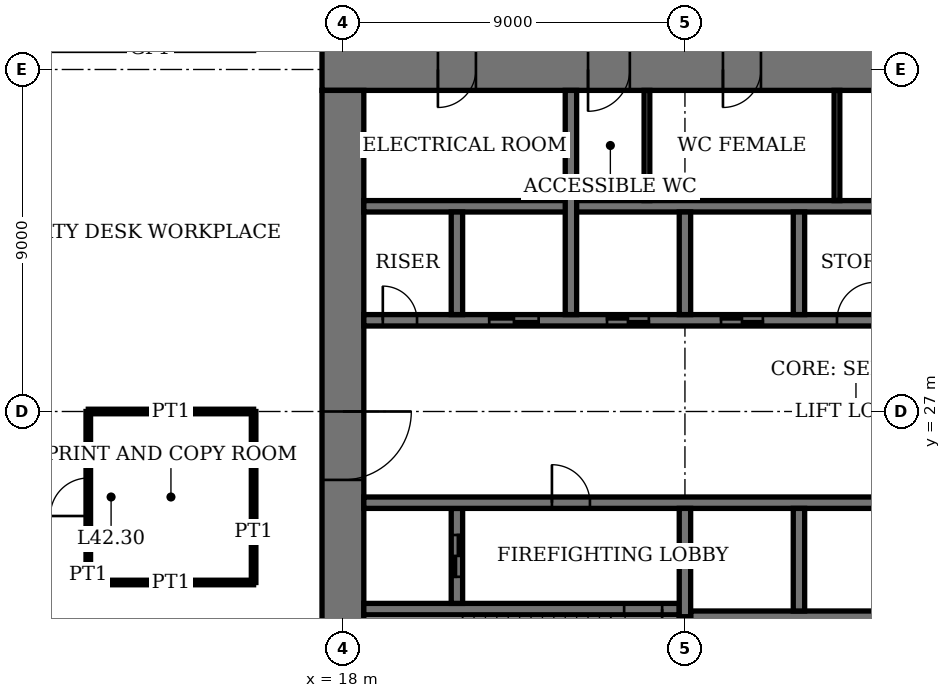
"""IFC4 building model, lengths in metres.
Left out: names, types, materials, properties, quantities, classifications, styles, units other than length and angle.
Written with IfcOpenShell. Run it as: python <this file> out.ifc"""

import sys

from ifc_helpers import new_model, si_unit, direction, frame, frame_2d, origin, place, context, subcontext, project, spatial, rectangle, extrude, element, fill, save


model = new_model("IFC4")
c1 = context("Model", 3, precision=1e-05, world=origin(), true_north=direction((0.0, 1.0)))
c2 = subcontext(c1, "Body", "Model", "MODEL_VIEW")
j1 = project(units=[si_unit("LENGTHUNIT", "METRE"), si_unit("PLANEANGLEUNIT", "RADIAN")], contexts=[c1])
p1 = place(None, origin())
s1 = spatial("IfcSite", under=j1, at=p1, CompositionType="ELEMENT")
p2 = place(p1, origin())
s2 = spatial("IfcBuilding", under=s1, at=p2, CompositionType="ELEMENT")
p3 = place(p2, frame((0.0, 0.0, 174.2)))
s3 = spatial("IfcBuildingStorey", under=s2, at=p3, CompositionType="ELEMENT", Elevation=174.2)
p4 = place(p3, frame((45.55, 36.0, 0.0), z_axis=(0.0, 0.0, 1.0), x_axis=(-1.0, 0.0, 0.0)))
e1 = element("IfcWall", 1, at=p4, inside=s3, PredefinedType="SHEAR", context=c2, shape_type="SweptSolid", body=[
    extrude(rectangle(XDim=28.1, YDim=1.1, at=frame_2d((14.05, 0.0))), origin(), (0.0, 0.0, 1.0), 4.0),
])
p5 = place(p4, frame((11.55, 0.0, 0.0)))
e2 = element("IfcOpeningElement", 2, at=p5, cuts=e1, PredefinedType="OPENING", context=c2, shape_type="SweptSolid", body=[
    extrude(rectangle(XDim=1.0, YDim=2.4, at=frame_2d((0.5, 1.2))), frame((0.0, 0.56, 0.0), z_axis=(0.0, -1.0, 0.0), x_axis=(1.0, 0.0, 0.0)), (0.0, 0.0, 1.0), 1.12),
])
p6 = place(p4, frame((16.55, 0.0, 0.0)))
e3 = element("IfcOpeningElement", 3, at=p6, cuts=e1, PredefinedType="OPENING", context=c2, shape_type="SweptSolid", body=[
    extrude(rectangle(XDim=1.0, YDim=2.4, at=frame_2d((0.5, 1.2))), frame((0.0, 0.56, 0.0), z_axis=(0.0, -1.0, 0.0), x_axis=(1.0, 0.0, 0.0)), (0.0, 0.0, 1.0), 1.12),
])
p7 = place(p4, frame((20.0, 0.0, 0.0)))
e4 = element("IfcOpeningElement", 4, at=p7, cuts=e1, PredefinedType="OPENING", context=c2, shape_type="SweptSolid", body=[
    extrude(rectangle(XDim=1.1, YDim=2.4, at=frame_2d((0.55, 1.2))), frame((0.0, 0.56, 0.0), z_axis=(0.0, -1.0, 0.0), x_axis=(1.0, 0.0, 0.0)), (0.0, 0.0, 1.0), 1.12),
])
p8 = place(p4, frame((24.05, 0.0, 0.0)))
e5 = element("IfcOpeningElement", 5, at=p8, cuts=e1, PredefinedType="OPENING", context=c2, shape_type="SweptSolid", body=[
    extrude(rectangle(XDim=1.0, YDim=2.4, at=frame_2d((0.5, 1.2))), frame((0.0, 0.56, 0.0), z_axis=(0.0, -1.0, 0.0), x_axis=(1.0, 0.0, 0.0)), (0.0, 0.0, 1.0), 1.12),
])
p9 = place(p3, frame((18.0, 35.45, 0.0), z_axis=(0.0, 0.0, 1.0), x_axis=(0.0, -1.0, 0.0)))
e6 = element("IfcWall", 6, at=p9, inside=s3, PredefinedType="SHEAR", context=c2, shape_type="SweptSolid", body=[
    extrude(rectangle(XDim=16.9, YDim=1.1, at=frame_2d((8.45, 0.0))), origin(), (0.0, 0.0, 1.0), 4.0),
])
p10 = place(p9, frame((8.45, 0.0, 0.0)))
e7 = element("IfcOpeningElement", 7, at=p10, cuts=e6, PredefinedType="OPENING", context=c2, shape_type="SweptSolid", body=[
    extrude(rectangle(XDim=1.8, YDim=2.4, at=frame_2d((0.9, 1.2))), frame((0.0, 0.56, 0.0), z_axis=(0.0, -1.0, 0.0), x_axis=(1.0, 0.0, 0.0)), (0.0, 0.0, 1.0), 1.12),
])
p11 = place(p3, frame((18.55, 21.8, 0.0), z_axis=(0.0, 0.0, 1.0), x_axis=(1.0, 0.0, 0.0)))
e8 = element("IfcWall", 8, at=p11, inside=s3, PredefinedType="SHEAR", context=c2, shape_type="SweptSolid", body=[
    extrude(rectangle(XDim=8.3, YDim=0.3, at=frame_2d((4.15, 0.0))), origin(), (0.0, 0.0, 1.0), 4.0),
])
p12 = place(p11, frame((6.85, 0.0, 0.0)))
e9 = element("IfcOpeningElement", 9, at=p12, cuts=e8, PredefinedType="OPENING", context=c2, shape_type="SweptSolid", body=[
    extrude(rectangle(XDim=1.0, YDim=2.4, at=frame_2d((0.5, 1.2))), frame((0.0, 0.16, 0.0), z_axis=(0.0, -1.0, 0.0), x_axis=(1.0, 0.0, 0.0)), (0.0, 0.0, 1.0), 0.32),
])
p13 = place(p3, frame((27.0, 18.55, 0.0), z_axis=(0.0, 0.0, 1.0), x_axis=(0.0, 1.0, 0.0)))
e10 = element("IfcWall", 10, at=p13, inside=s3, PredefinedType="SHEAR", context=c2, shape_type="SweptSolid", body=[
    extrude(rectangle(XDim=3.05, YDim=0.3, at=frame_2d((1.525, 0.0))), origin(), (0.0, 0.0, 1.0), 4.0),
])
p14 = place(p3, frame((21.0, 21.95, 0.0), z_axis=(0.0, 0.0, 1.0), x_axis=(0.0, 1.0, 0.0)))
e11 = element("IfcWall", 11, at=p14, inside=s3, PredefinedType="SHEAR", context=c2, shape_type="SweptSolid", body=[
    extrude(rectangle(XDim=2.5, YDim=0.3, at=frame_2d((1.25, 0.0))), origin(), (0.0, 0.0, 1.0), 4.0),
])
p15 = place(p14, frame((0.7, 0.0, 0.0)))
e12 = element("IfcOpeningElement", 12, at=p15, cuts=e11, PredefinedType="OPENING", context=c2, shape_type="SweptSolid", body=[
    extrude(rectangle(XDim=1.1, YDim=2.4, at=frame_2d((0.55, 1.2))), frame((0.0, 0.16, 0.0), z_axis=(0.0, -1.0, 0.0), x_axis=(1.0, 0.0, 0.0)), (0.0, 0.0, 1.0), 0.32),
])
p16 = place(p3, frame((18.55, 24.6, 0.0), z_axis=(0.0, 0.0, 1.0), x_axis=(1.0, 0.0, 0.0)))
e13 = element("IfcWall", 13, at=p16, inside=s3, PredefinedType="SHEAR", context=c2, shape_type="SweptSolid", body=[
    extrude(rectangle(XDim=25.9, YDim=0.3, at=frame_2d((12.95, 0.0))), origin(), (0.0, 0.0, 1.0), 4.0),
])
p17 = place(p16, frame((4.95, 0.0, 0.0)))
e14 = element("IfcOpeningElement", 14, at=p17, cuts=e13, PredefinedType="OPENING", context=c2, shape_type="SweptSolid", body=[
    extrude(rectangle(XDim=1.0, YDim=2.4, at=frame_2d((0.5, 1.2))), frame((0.0, 0.16, 0.0), z_axis=(0.0, -1.0, 0.0), x_axis=(1.0, 0.0, 0.0)), (0.0, 0.0, 1.0), 0.32),
])
p18 = place(p16, frame((24.5, 0.0, 0.0)))
e15 = element("IfcOpeningElement", 15, at=p18, cuts=e13, PredefinedType="OPENING", context=c2, shape_type="SweptSolid", body=[
    extrude(rectangle(XDim=0.9, YDim=2.1, at=frame_2d((0.45, 1.05))), frame((0.0, 0.16, 0.0), z_axis=(0.0, -1.0, 0.0), x_axis=(1.0, 0.0, 0.0)), (0.0, 0.0, 1.0), 0.32),
])
p19 = place(p16, frame((21.3, 0.0, 0.0)))
e16 = element("IfcOpeningElement", 16, at=p19, cuts=e13, PredefinedType="OPENING", context=c2, shape_type="SweptSolid", body=[
    extrude(rectangle(XDim=1.3, YDim=2.4, at=frame_2d((0.65, 1.2))), frame((0.0, 0.16, 0.0), z_axis=(0.0, -1.0, 0.0), x_axis=(1.0, 0.0, 0.0)), (0.0, 0.0, 1.0), 0.32),
])
p20 = place(p3, frame((18.55, 29.4, 0.0), z_axis=(0.0, 0.0, 1.0), x_axis=(1.0, 0.0, 0.0)))
e17 = element("IfcWall", 17, at=p20, inside=s3, PredefinedType="SHEAR", context=c2, shape_type="SweptSolid", body=[
    extrude(rectangle(XDim=25.9, YDim=0.3, at=frame_2d((12.95, 0.0))), origin(), (0.0, 0.0, 1.0), 4.0),
])
p21 = place(p20, frame((19.95, 0.0, 0.0)))
e18 = element("IfcOpeningElement", 18, at=p21, cuts=e17, PredefinedType="OPENING", context=c2, shape_type="SweptSolid", body=[
    extrude(rectangle(XDim=1.0, YDim=2.4, at=frame_2d((0.5, 1.2))), frame((0.0, 0.16, 0.0), z_axis=(0.0, -1.0, 0.0), x_axis=(1.0, 0.0, 0.0)), (0.0, 0.0, 1.0), 0.32),
])
p22 = place(p20, frame((0.5, 0.0, 0.0)))
e19 = element("IfcOpeningElement", 19, at=p22, cuts=e17, PredefinedType="OPENING", context=c2, shape_type="SweptSolid", body=[
    extrude(rectangle(XDim=0.9, YDim=2.1, at=frame_2d((0.45, 1.05))), frame((0.0, 0.16, 0.0), z_axis=(0.0, -1.0, 0.0), x_axis=(1.0, 0.0, 0.0)), (0.0, 0.0, 1.0), 0.32),
])
p23 = place(p20, frame((15.45, 0.0, 0.0)))
e20 = element("IfcOpeningElement", 20, at=p23, cuts=e17, PredefinedType="OPENING", context=c2, shape_type="SweptSolid", body=[
    extrude(rectangle(XDim=1.0, YDim=2.4, at=frame_2d((0.5, 1.2))), frame((0.0, 0.16, 0.0), z_axis=(0.0, -1.0, 0.0), x_axis=(1.0, 0.0, 0.0)), (0.0, 0.0, 1.0), 0.32),
])
p24 = place(p20, frame((12.45, 0.0, 0.0)))
e21 = element("IfcOpeningElement", 21, at=p24, cuts=e17, PredefinedType="OPENING", context=c2, shape_type="SweptSolid", body=[
    extrude(rectangle(XDim=1.0, YDim=2.4, at=frame_2d((0.5, 1.2))), frame((0.0, 0.16, 0.0), z_axis=(0.0, -1.0, 0.0), x_axis=(1.0, 0.0, 0.0)), (0.0, 0.0, 1.0), 0.32),
])
p25 = place(p20, frame((9.4, 0.0, 0.0)))
e22 = element("IfcOpeningElement", 22, at=p25, cuts=e17, PredefinedType="OPENING", context=c2, shape_type="SweptSolid", body=[
    extrude(rectangle(XDim=1.1, YDim=2.4, at=frame_2d((0.55, 1.2))), frame((0.0, 0.16, 0.0), z_axis=(0.0, -1.0, 0.0), x_axis=(1.0, 0.0, 0.0)), (0.0, 0.0, 1.0), 0.32),
])
p26 = place(p20, frame((6.4, 0.0, 0.0)))
e23 = element("IfcOpeningElement", 23, at=p26, cuts=e17, PredefinedType="OPENING", context=c2, shape_type="SweptSolid", body=[
    extrude(rectangle(XDim=1.1, YDim=2.4, at=frame_2d((0.55, 1.2))), frame((0.0, 0.16, 0.0), z_axis=(0.0, -1.0, 0.0), x_axis=(1.0, 0.0, 0.0)), (0.0, 0.0, 1.0), 0.32),
])
p27 = place(p20, frame((3.3, 0.0, 0.0)))
e24 = element("IfcOpeningElement", 24, at=p27, cuts=e17, PredefinedType="OPENING", context=c2, shape_type="SweptSolid", body=[
    extrude(rectangle(XDim=1.3, YDim=2.4, at=frame_2d((0.65, 1.2))), frame((0.0, 0.16, 0.0), z_axis=(0.0, -1.0, 0.0), x_axis=(1.0, 0.0, 0.0)), (0.0, 0.0, 1.0), 0.32),
])
for number, where, z_axis, x_axis in (
    (25, (27.15, 21.6, 0.0), (0.0, 0.0, 1.0), (1.0, 0.0, 0.0)),
    (26, (18.55, 32.4, 0.0), (0.0, 0.0, 1.0), (1.0, 0.0, 0.0)),
):
    element("IfcWall", number, at=place(p3, frame(where, z_axis=z_axis, x_axis=x_axis)), inside=s3, PredefinedType="SHEAR", context=c2, shape_type="SweptSolid", body=[
        extrude(rectangle(XDim=17.3, YDim=0.3, at=frame_2d((8.65, 0.0))), origin(), (0.0, 0.0, 1.0), 4.0),
    ])
for number, where, z_axis, x_axis in (
    (27, (30.0, 21.75, 0.0), (0.0, 0.0, 1.0), (0.0, 1.0, 0.0)),
    (28, (30.0, 29.55, 0.0), (0.0, 0.0, 1.0), (0.0, 1.0, 0.0)),
    (29, (27.0, 29.55, 0.0), (0.0, 0.0, 1.0), (0.0, 1.0, 0.0)),
):
    element("IfcWall", number, at=place(p3, frame(where, z_axis=z_axis, x_axis=x_axis)), inside=s3, PredefinedType="SHEAR", context=c2, shape_type="SweptSolid", body=[
        extrude(rectangle(XDim=2.7, YDim=0.3, at=frame_2d((1.35, 0.0))), origin(), (0.0, 0.0, 1.0), 4.0),
    ])
p28 = place(p3, frame((24.0, 29.55, 0.0), z_axis=(0.0, 0.0, 1.0), x_axis=(0.0, 1.0, 0.0)))
e30 = element("IfcWall", 30, at=p28, inside=s3, PredefinedType="SHEAR", context=c2, shape_type="SweptSolid", body=[
    extrude(rectangle(XDim=5.9, YDim=0.3, at=frame_2d((2.95, 0.0))), origin(), (0.0, 0.0, 1.0), 4.0),
])
p29 = place(p3, frame((21.0, 29.55, 0.0), z_axis=(0.0, 0.0, 1.0), x_axis=(0.0, 1.0, 0.0)))
e31 = element("IfcWall", 31, at=p29, inside=s3, PredefinedType="SHEAR", context=c2, shape_type="SweptSolid", body=[
    extrude(rectangle(XDim=2.7, YDim=0.3, at=frame_2d((1.35, 0.0))), origin(), (0.0, 0.0, 1.0), 4.0),
])
p30 = place(p3, frame((27.0, 21.6, 0.0), z_axis=(0.0, 0.0, 1.0), x_axis=(0.0, 1.0, 0.0)))
e32 = element("IfcWall", 32, at=p30, inside=s3, PredefinedType="SHEAR", context=c2, shape_type="SweptSolid", body=[
    extrude(rectangle(XDim=2.85, YDim=0.3, at=frame_2d((1.425, 0.0))), origin(), (0.0, 0.0, 1.0), 4.0),
])
p31 = place(p3, frame((11.3, 22.5, 0.0), z_axis=(0.0, 0.0, 1.0), x_axis=(1.0, 0.0, 0.0)))
e33 = element("IfcWall", 33, at=p31, inside=s3, PredefinedType="PARTITIONING", context=c2, shape_type="SweptSolid", body=[
    extrude(rectangle(XDim=4.35, YDim=0.12, at=frame_2d((2.175, 0.0))), origin(), (0.0, 0.0, 1.0), 3.1),
])
p32 = place(p3, frame((11.3, 27.0, 0.0), z_axis=(0.0, 0.0, 1.0), x_axis=(1.0, 0.0, 0.0)))
e34 = element("IfcWall", 34, at=p32, inside=s3, PredefinedType="PARTITIONING", context=c2, shape_type="SweptSolid", body=[
    extrude(rectangle(XDim=4.35, YDim=0.12, at=frame_2d((2.175, 0.0))), origin(), (0.0, 0.0, 1.0), 3.05),
])
p33 = place(p3, frame((11.3, 22.5, 0.0), z_axis=(0.0, 0.0, 1.0), x_axis=(0.0, 1.0, 0.0)))
e35 = element("IfcWall", 35, at=p33, inside=s3, PredefinedType="PARTITIONING", context=c2, shape_type="SweptSolid", body=[
    extrude(rectangle(XDim=4.5, YDim=0.12, at=frame_2d((2.25, 0.0))), origin(), (0.0, 0.0, 1.0), 3.75),
])
p34 = place(p33, frame((1.75, 0.0, 0.0)))
e36 = element("IfcOpeningElement", 36, at=p34, cuts=e35, PredefinedType="OPENING", context=c2, shape_type="SweptSolid", body=[
    extrude(rectangle(XDim=1.0, YDim=2.4, at=frame_2d((0.5, 1.2))), frame((0.0, 0.07, 0.0), z_axis=(0.0, -1.0, 0.0), x_axis=(1.0, 0.0, 0.0)), (0.0, 0.0, 1.0), 0.14),
])
p35 = place(p3, frame((15.65, 22.5, 0.0), z_axis=(0.0, 0.0, 1.0), x_axis=(0.0, 1.0, 0.0)))
e37 = element("IfcWall", 37, at=p35, inside=s3, PredefinedType="PARTITIONING", context=c2, shape_type="SweptSolid", body=[
    extrude(rectangle(XDim=4.5, YDim=0.12, at=frame_2d((2.25, 0.0))), origin(), (0.0, 0.0, 1.0), 3.75),
])
for number, where, z_axis, x_axis in (
    (38, (31.0, 32.55, 0.0), (0.0, 0.0, 1.0), (0.0, 1.0, 0.0)),
    (39, (26.0, 32.55, 0.0), (0.0, 0.0, 1.0), (0.0, 1.0, 0.0)),
):
    element("IfcWall", number, at=place(p3, frame(where, z_axis=z_axis, x_axis=x_axis)), inside=s3, PredefinedType="PARTITIONING", context=c2, shape_type="SweptSolid", body=[
        extrude(rectangle(XDim=2.9, YDim=0.15, at=frame_2d((1.45, 0.0))), origin(), (0.0, 0.0, 1.0), 3.75),
    ])
p36 = place(p10, origin())
e40 = element("IfcDoor", 40, at=p36, inside=s3, OperationType="DOUBLE_DOOR_DOUBLE_SWING", PredefinedType="DOOR", context=c2, shape_type="SweptSolid", body=[
    extrude(rectangle(XDim=1.8, YDim=2.4, at=frame_2d((0.9, 1.2))), frame((0.0, 0.03, 0.0), z_axis=(0.0, -1.0, 0.0), x_axis=(1.0, 0.0, 0.0)), (0.0, 0.0, 1.0), 0.06),
    extrude(rectangle(XDim=0.04, YDim=2.4, at=frame_2d((0.02, 1.2))), frame((0.0, 0.55, 0.0), z_axis=(0.0, -1.0, 0.0), x_axis=(1.0, 0.0, 0.0)), (0.0, 0.0, 1.0), 1.1),
    extrude(rectangle(XDim=0.04, YDim=2.4, at=frame_2d((1.78, 1.2))), frame((0.0, 0.55, 0.0), z_axis=(0.0, -1.0, 0.0), x_axis=(1.0, 0.0, 0.0)), (0.0, 0.0, 1.0), 1.1),
    extrude(rectangle(XDim=1.8, YDim=0.04, at=frame_2d((0.9, 2.38))), frame((0.0, 0.55, 0.0), z_axis=(0.0, -1.0, 0.0), x_axis=(1.0, 0.0, 0.0)), (0.0, 0.0, 1.0), 1.1),
])
fill(e7, e40)
p37 = place(p6, origin())
e41 = element("IfcDoor", 41, at=p37, inside=s3, OperationType="SINGLE_SWING_LEFT", PredefinedType="DOOR", context=c2, shape_type="SweptSolid", body=[
    extrude(rectangle(XDim=1.0, YDim=2.4, at=frame_2d((0.5, 1.2))), frame((0.0, 0.025, 0.0), z_axis=(0.0, -1.0, 0.0), x_axis=(1.0, 0.0, 0.0)), (0.0, 0.0, 1.0), 0.05),
    extrude(rectangle(XDim=0.04, YDim=2.4, at=frame_2d((0.02, 1.2))), frame((0.0, 0.4, 0.0), z_axis=(0.0, -1.0, 0.0), x_axis=(1.0, 0.0, 0.0)), (0.0, 0.0, 1.0), 0.8),
    extrude(rectangle(XDim=0.04, YDim=2.4, at=frame_2d((0.98, 1.2))), frame((0.0, 0.4, 0.0), z_axis=(0.0, -1.0, 0.0), x_axis=(1.0, 0.0, 0.0)), (0.0, 0.0, 1.0), 0.8),
    extrude(rectangle(XDim=1.0, YDim=0.04, at=frame_2d((0.5, 2.38))), frame((0.0, 0.4, 0.0), z_axis=(0.0, -1.0, 0.0), x_axis=(1.0, 0.0, 0.0)), (0.0, 0.0, 1.0), 0.8),
])
fill(e3, e41)
p38 = place(p7, origin())
e42 = element("IfcDoor", 42, at=p38, inside=s3, OperationType="SINGLE_SWING_LEFT", PredefinedType="DOOR", context=c2, shape_type="SweptSolid", body=[
    extrude(rectangle(XDim=1.1, YDim=2.4, at=frame_2d((0.55, 1.2))), frame((0.0, 0.025, 0.0), z_axis=(0.0, -1.0, 0.0), x_axis=(1.0, 0.0, 0.0)), (0.0, 0.0, 1.0), 0.05),
    extrude(rectangle(XDim=0.04, YDim=2.4, at=frame_2d((0.02, 1.2))), frame((0.0, 0.44, 0.0), z_axis=(0.0, -1.0, 0.0), x_axis=(1.0, 0.0, 0.0)), (0.0, 0.0, 1.0), 0.88),
    extrude(rectangle(XDim=0.04, YDim=2.4, at=frame_2d((1.08, 1.2))), frame((0.0, 0.44, 0.0), z_axis=(0.0, -1.0, 0.0), x_axis=(1.0, 0.0, 0.0)), (0.0, 0.0, 1.0), 0.88),
    extrude(rectangle(XDim=1.1, YDim=0.04, at=frame_2d((0.55, 2.38))), frame((0.0, 0.44, 0.0), z_axis=(0.0, -1.0, 0.0), x_axis=(1.0, 0.0, 0.0)), (0.0, 0.0, 1.0), 0.88),
])
fill(e4, e42)
p39 = place(p8, origin())
e43 = element("IfcDoor", 43, at=p39, inside=s3, OperationType="SINGLE_SWING_LEFT", PredefinedType="DOOR", context=c2, shape_type="SweptSolid", body=[
    extrude(rectangle(XDim=1.0, YDim=2.4, at=frame_2d((0.5, 1.2))), frame((0.0, 0.025, 0.0), z_axis=(0.0, -1.0, 0.0), x_axis=(1.0, 0.0, 0.0)), (0.0, 0.0, 1.0), 0.05),
    extrude(rectangle(XDim=0.04, YDim=2.4, at=frame_2d((0.02, 1.2))), frame((0.0, 0.4, 0.0), z_axis=(0.0, -1.0, 0.0), x_axis=(1.0, 0.0, 0.0)), (0.0, 0.0, 1.0), 0.8),
    extrude(rectangle(XDim=0.04, YDim=2.4, at=frame_2d((0.98, 1.2))), frame((0.0, 0.4, 0.0), z_axis=(0.0, -1.0, 0.0), x_axis=(1.0, 0.0, 0.0)), (0.0, 0.0, 1.0), 0.8),
    extrude(rectangle(XDim=1.0, YDim=0.04, at=frame_2d((0.5, 2.38))), frame((0.0, 0.4, 0.0), z_axis=(0.0, -1.0, 0.0), x_axis=(1.0, 0.0, 0.0)), (0.0, 0.0, 1.0), 0.8),
])
fill(e5, e43)
p40 = place(p12, origin())
e44 = element("IfcDoor", 44, at=p40, inside=s3, OperationType="SINGLE_SWING_RIGHT", PredefinedType="DOOR", context=c2, shape_type="SweptSolid", body=[
    extrude(rectangle(XDim=1.0, YDim=2.4, at=frame_2d((0.5, 1.2))), frame((0.0, 0.03, 0.0), z_axis=(0.0, -1.0, 0.0), x_axis=(1.0, 0.0, 0.0)), (0.0, 0.0, 1.0), 0.06),
])
fill(e9, e44)
p41 = place(p17, origin())
e45 = element("IfcDoor", 45, at=p41, inside=s3, OperationType="SINGLE_SWING_RIGHT", PredefinedType="DOOR", context=c2, shape_type="SweptSolid", body=[
    extrude(rectangle(XDim=1.0, YDim=2.4, at=frame_2d((0.5, 1.2))), frame((0.0, 0.03, 0.0), z_axis=(0.0, -1.0, 0.0), x_axis=(1.0, 0.0, 0.0)), (0.0, 0.0, 1.0), 0.06),
])
fill(e14, e45)
p42 = place(p22, origin())
e46 = element("IfcDoor", 46, at=p42, inside=s3, OperationType="SINGLE_SWING_RIGHT", PredefinedType="DOOR", context=c2, shape_type="SweptSolid", body=[
    extrude(rectangle(XDim=0.9, YDim=2.1, at=frame_2d((0.45, 1.05))), frame((0.0, 0.03, 0.0), z_axis=(0.0, -1.0, 0.0), x_axis=(1.0, 0.0, 0.0)), (0.0, 0.0, 1.0), 0.06),
])
fill(e19, e46)
p43 = place(p34, origin())
e47 = element("IfcDoor", 47, at=p43, inside=s3, OperationType="SINGLE_SWING_RIGHT", PredefinedType="DOOR", context=c2, shape_type="SweptSolid", body=[
    extrude(rectangle(XDim=1.0, YDim=2.4, at=frame_2d((0.5, 1.2))), frame((0.0, 0.025, 0.0), z_axis=(0.0, -1.0, 0.0), x_axis=(1.0, 0.0, 0.0)), (0.0, 0.0, 1.0), 0.05),
])
fill(e36, e47)
p44 = place(p24, origin())
e48 = element("IfcDoor", 48, at=p44, inside=s3, OperationType="SINGLE_SWING_LEFT", PredefinedType="DOOR", context=c2, shape_type="SweptSolid", body=[
    extrude(rectangle(XDim=1.0, YDim=2.4, at=frame_2d((0.5, 1.2))), frame((0.0, 0.03, 0.0), z_axis=(0.0, -1.0, 0.0), x_axis=(1.0, 0.0, 0.0)), (0.0, 0.0, 1.0), 0.06),
])
fill(e21, e48)
p45 = place(p25, origin())
e49 = element("IfcDoor", 49, at=p45, inside=s3, OperationType="DOUBLE_DOOR_SLIDING", PredefinedType="DOOR", context=c2, shape_type="SweptSolid", body=[
    extrude(rectangle(XDim=1.1, YDim=2.4, at=frame_2d((0.55, 1.2))), frame((0.0, 0.02, 0.0), z_axis=(0.0, -1.0, 0.0), x_axis=(1.0, 0.0, 0.0)), (0.0, 0.0, 1.0), 0.04),
])
fill(e22, e49)
p46 = place(p26, origin())
e50 = element("IfcDoor", 50, at=p46, inside=s3, OperationType="DOUBLE_DOOR_SLIDING", PredefinedType="DOOR", context=c2, shape_type="SweptSolid", body=[
    extrude(rectangle(XDim=1.1, YDim=2.4, at=frame_2d((0.55, 1.2))), frame((0.0, 0.02, 0.0), z_axis=(0.0, -1.0, 0.0), x_axis=(1.0, 0.0, 0.0)), (0.0, 0.0, 1.0), 0.04),
])
fill(e23, e50)
p47 = place(p27, origin())
e51 = element("IfcDoor", 51, at=p47, inside=s3, OperationType="DOUBLE_DOOR_SLIDING", PredefinedType="DOOR", context=c2, shape_type="SweptSolid", body=[
    extrude(rectangle(XDim=1.3, YDim=2.4, at=frame_2d((0.65, 1.2))), frame((0.0, 0.02, 0.0), z_axis=(0.0, -1.0, 0.0), x_axis=(1.0, 0.0, 0.0)), (0.0, 0.0, 1.0), 0.04),
])
fill(e24, e51)
p48 = place(p15, origin())
e52 = element("IfcDoor", 52, at=p48, inside=s3, OperationType="DOUBLE_DOOR_SLIDING", PredefinedType="DOOR", context=c2, shape_type="SweptSolid", body=[
    extrude(rectangle(XDim=1.1, YDim=2.4, at=frame_2d((0.55, 1.2))), frame((0.0, 0.03, 0.0), z_axis=(0.0, -1.0, 0.0), x_axis=(1.0, 0.0, 0.0)), (0.0, 0.0, 1.0), 0.06),
])
fill(e12, e52)
save(model, sys.argv[1])
